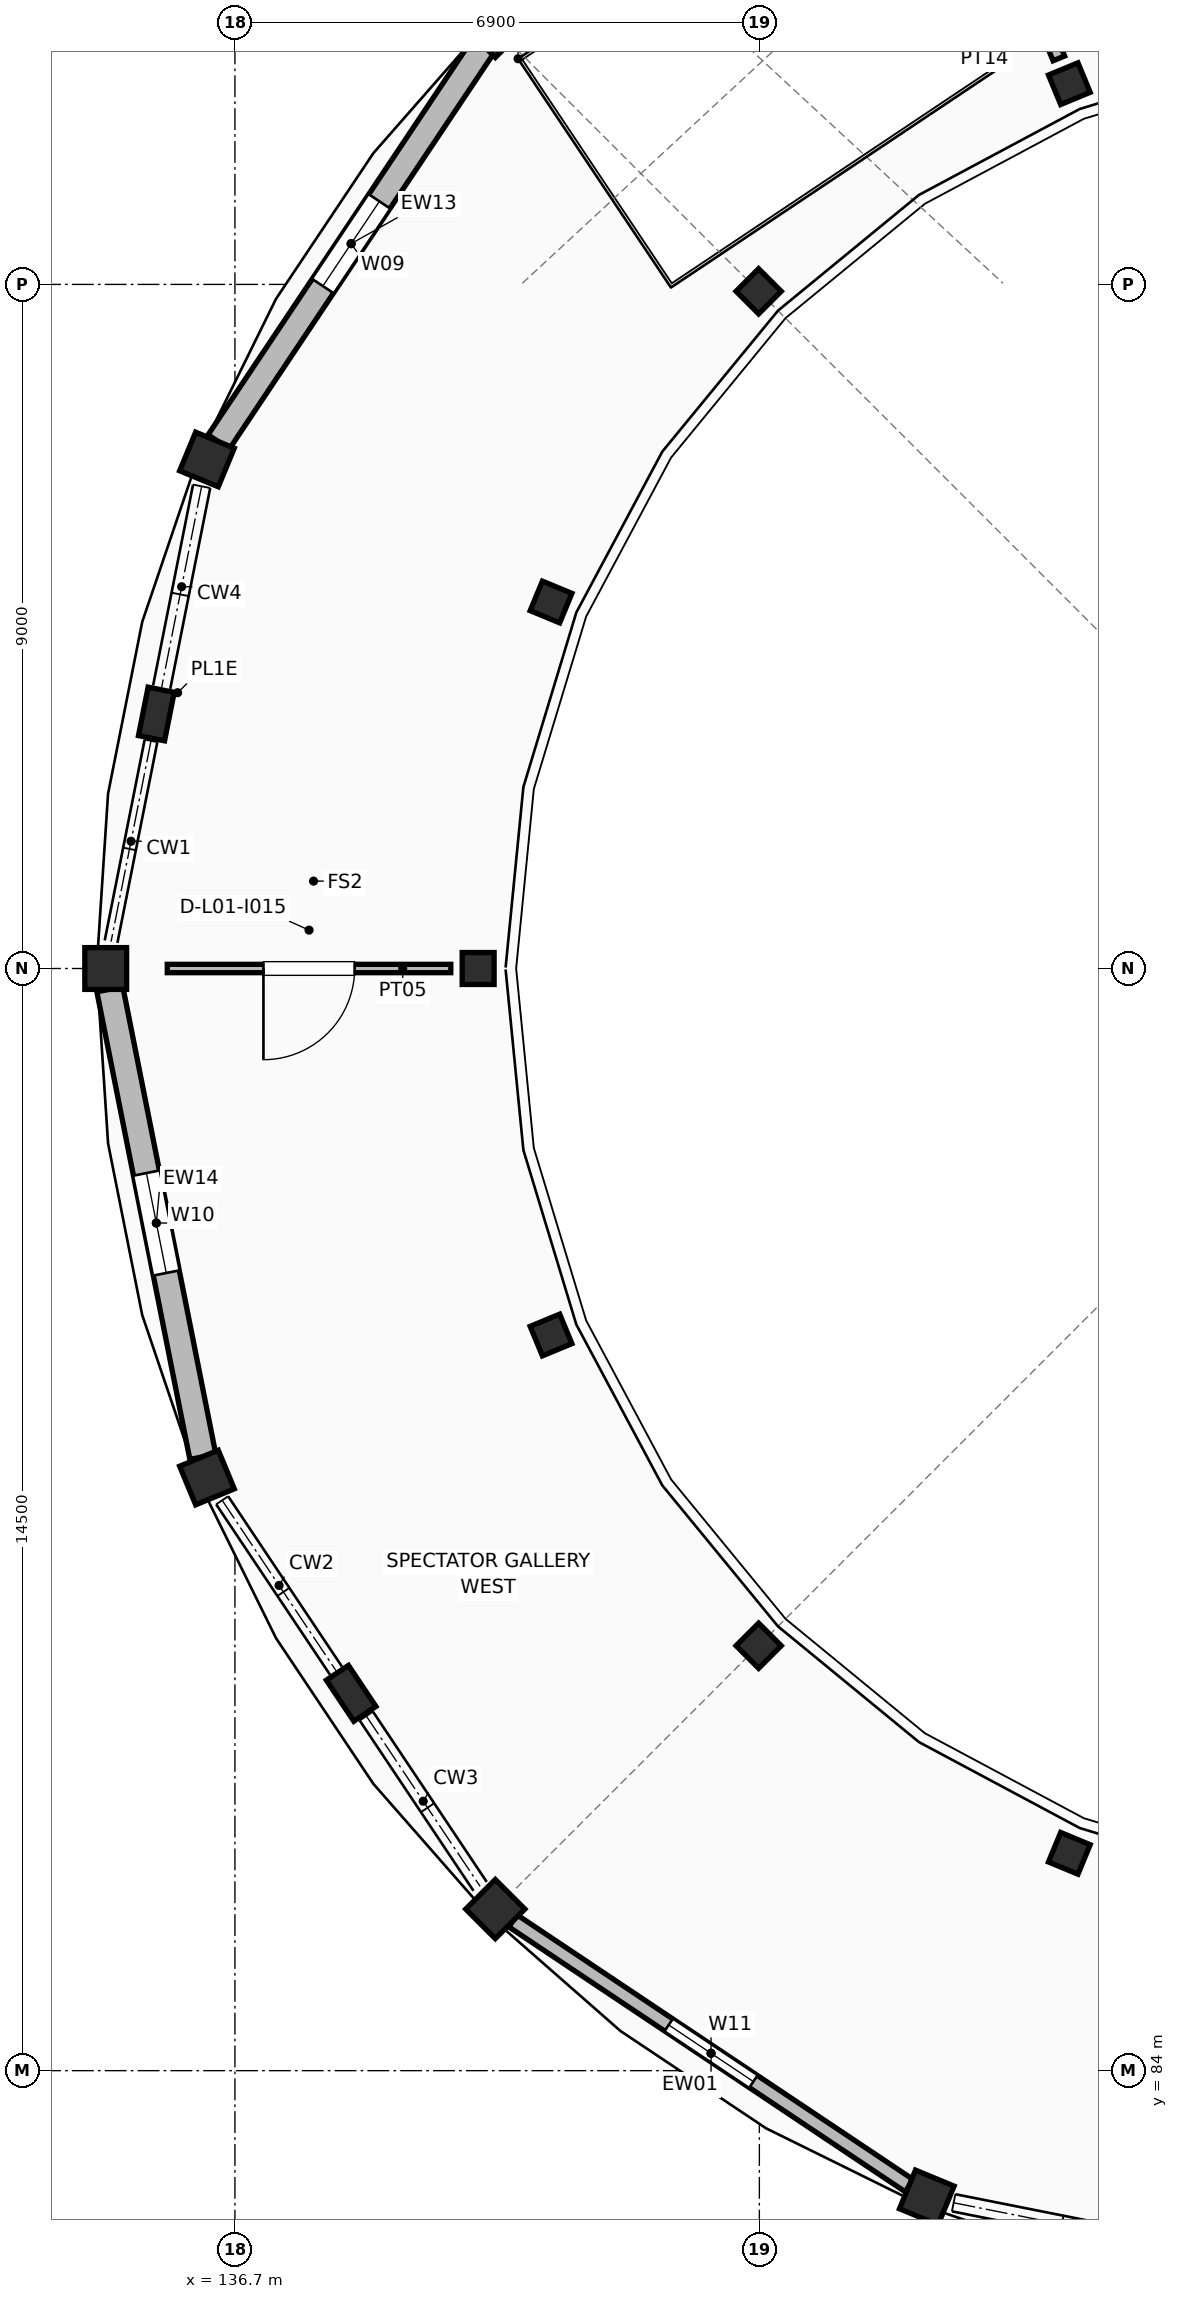
"""IFC4 building model, lengths in metres.
Left out: names, types, materials, properties, quantities, classifications, styles, units other than length and angle.
Written with IfcOpenShell. Run it as: python <this file> out.ifc"""

import sys

from ifc_helpers import new_model, si_unit, direction, frame, frame_2d, origin, origin_2d, place, context, subcontext, project, spatial, rectangle, extrude, element, fill, save


model = new_model("IFC4")
c1 = context("Model", 3, precision=1e-05, world=origin(), true_north=direction((0.0, 1.0)))
c2 = subcontext(c1, "Body", "Model", "MODEL_VIEW")
j1 = project(units=[si_unit("LENGTHUNIT", "METRE"), si_unit("PLANEANGLEUNIT", "RADIAN")], contexts=[c1])
p1 = place(None, origin())
s1 = spatial("IfcSite", under=j1, at=p1, CompositionType="ELEMENT")
p2 = place(p1, origin())
s2 = spatial("IfcBuilding", under=s1, at=p2, CompositionType="ELEMENT")
p3 = place(p2, frame((0.0, 0.0, 4.42)))
s3 = spatial("IfcBuildingStorey", under=s2, at=p3, CompositionType="ELEMENT", Elevation=4.42)
for number, where, z_axis, x_axis in (
    (1, (147.678, 110.141, 0.0), (0.0, 0.0, 1.0), (-0.383, 0.924, 0.0)),
    (2, (143.591, 107.409, 0.0), (0.0, 0.0, 1.0), (-0.707, 0.707, 0.0)),
):
    element("IfcColumn", number, at=place(p3, frame(where, z_axis=z_axis, x_axis=x_axis)), inside=s3, PredefinedType="COLUMN", context=c2, shape_type="SweptSolid", body=[
        extrude(rectangle(XDim=0.42, YDim=0.42, at=origin_2d()), origin(), (0.0, 0.0, 1.0), 3.74),
    ])
p4 = place(p3, frame((140.126, 110.874, 0.0), z_axis=(0.0, 0.0, 1.0), x_axis=(-0.707106781187, 0.707106781187, 0.0)))
e3 = element("IfcColumn", 3, at=p4, inside=s3, PredefinedType="COLUMN", context=c2, shape_type="SweptSolid", body=[
    extrude(rectangle(XDim=0.55, YDim=0.55, at=origin_2d()), origin(), (0.0, 0.0, 1.0), 3.74),
])
p5 = place(p3, frame((140.859, 103.322, 0.0), z_axis=(0.0, 0.0, 1.0), x_axis=(-0.923879532511, 0.382683432365, 0.0)))
e4 = element("IfcColumn", 4, at=p5, inside=s3, PredefinedType="COLUMN", context=c2, shape_type="SweptSolid", body=[
    extrude(rectangle(XDim=0.42, YDim=0.42, at=origin_2d()), origin(), (0.0, 0.0, 1.0), 3.74),
])
p6 = place(p3, frame((136.332, 105.197, 0.0), z_axis=(0.0, 0.0, 1.0), x_axis=(-0.923879532511, 0.382683432365, 0.0)))
e5 = element("IfcColumn", 5, at=p6, inside=s3, PredefinedType="COLUMN", context=c2, shape_type="SweptSolid", body=[
    extrude(rectangle(XDim=0.55, YDim=0.55, at=origin_2d()), origin(), (0.0, 0.0, 1.0), 3.74),
])
p7 = place(p3, frame((139.9, 98.5, 0.0), z_axis=(0.0, 0.0, 1.0), x_axis=(-1.0, 0.0, 0.0)))
e6 = element("IfcColumn", 6, at=p7, inside=s3, PredefinedType="COLUMN", context=c2, shape_type="SweptSolid", body=[
    extrude(rectangle(XDim=0.42, YDim=0.42, at=origin_2d()), origin(), (0.0, 0.0, 1.0), 3.74),
])
p8 = place(p3, frame((135.0, 98.5, 0.0), z_axis=(0.0, 0.0, 1.0), x_axis=(-1.0, 0.0, 0.0)))
e7 = element("IfcColumn", 7, at=p8, inside=s3, PredefinedType="COLUMN", context=c2, shape_type="SweptSolid", body=[
    extrude(rectangle(XDim=0.55, YDim=0.55, at=origin_2d()), origin(), (0.0, 0.0, 1.0), 3.74),
])
p9 = place(p3, frame((140.859, 93.678, 0.0), z_axis=(0.0, 0.0, 1.0), x_axis=(-0.923879532511, -0.382683432365, 0.0)))
e8 = element("IfcColumn", 8, at=p9, inside=s3, PredefinedType="COLUMN", context=c2, shape_type="SweptSolid", body=[
    extrude(rectangle(XDim=0.42, YDim=0.42, at=origin_2d()), origin(), (0.0, 0.0, 1.0), 3.74),
])
p10 = place(p3, frame((136.332, 91.803, 0.0), z_axis=(0.0, 0.0, 1.0), x_axis=(-0.923879532511, -0.382683432365, 0.0)))
e9 = element("IfcColumn", 9, at=p10, inside=s3, PredefinedType="COLUMN", context=c2, shape_type="SweptSolid", body=[
    extrude(rectangle(XDim=0.55, YDim=0.55, at=origin_2d()), origin(), (0.0, 0.0, 1.0), 3.74),
])
p11 = place(p3, frame((143.591, 89.591, 0.0), z_axis=(0.0, 0.0, 1.0), x_axis=(-0.707106781187, -0.707106781187, 0.0)))
e10 = element("IfcColumn", 10, at=p11, inside=s3, PredefinedType="COLUMN", context=c2, shape_type="SweptSolid", body=[
    extrude(rectangle(XDim=0.42, YDim=0.42, at=origin_2d()), origin(), (0.0, 0.0, 1.0), 3.74),
])
p12 = place(p3, frame((140.126, 86.126, 0.0), z_axis=(0.0, 0.0, 1.0), x_axis=(-0.707106781187, -0.707106781187, 0.0)))
e11 = element("IfcColumn", 11, at=p12, inside=s3, PredefinedType="COLUMN", context=c2, shape_type="SweptSolid", body=[
    extrude(rectangle(XDim=0.55, YDim=0.55, at=origin_2d()), origin(), (0.0, 0.0, 1.0), 3.74),
])
p13 = place(p3, frame((147.678, 86.859, 0.0), z_axis=(0.0, 0.0, 1.0), x_axis=(-0.382683432365, -0.923879532511, 0.0)))
e12 = element("IfcColumn", 12, at=p13, inside=s3, PredefinedType="COLUMN", context=c2, shape_type="SweptSolid", body=[
    extrude(rectangle(XDim=0.42, YDim=0.42, at=origin_2d()), origin(), (0.0, 0.0, 1.0), 3.74),
])
p14 = place(p3, frame((145.803, 82.332, 0.0), z_axis=(0.0, 0.0, 1.0), x_axis=(-0.382683432365, -0.923879532511, 0.0)))
e13 = element("IfcColumn", 13, at=p14, inside=s3, PredefinedType="COLUMN", context=c2, shape_type="SweptSolid", body=[
    extrude(rectangle(XDim=0.55, YDim=0.55, at=origin_2d()), origin(), (0.0, 0.0, 1.0), 3.74),
])
for number, where, z_axis, x_axis in (
    (14, (135.666, 101.848, 0.0), (0.0, 0.0, 1.0), (-0.981, 0.195, 0.0)),
    (15, (138.229, 88.964, 0.0), (0.0, 0.0, 1.0), (-0.831, -0.556, 0.0)),
):
    element("IfcColumn", number, at=place(p3, frame(where, z_axis=z_axis, x_axis=x_axis)), inside=s3, PredefinedType="PILASTER", context=c2, shape_type="SweptSolid", body=[
        extrude(rectangle(XDim=0.35, YDim=0.65, at=origin_2d()), origin(), (0.0, 0.0, 1.0), 3.74),
    ])
p15 = place(p3, frame((139.971, 110.643, 0.0), z_axis=(0.0, 0.0, 1.0), x_axis=(-0.555571204893, -0.831468962917, 0.0)))
e16 = element("IfcWall", 16, at=p15, inside=s3, PredefinedType="STANDARD", context=c2, shape_type="SweptSolid", body=[
    extrude(rectangle(XDim=6.272, YDim=0.336, at=frame_2d((3.136, 0.0))), origin(), (0.0, 0.0, 1.0), 2.78),
])
p16 = place(p15, frame((2.466, 0.0, 0.95)))
e17 = element("IfcOpeningElement", 17, at=p16, cuts=e16, PredefinedType="OPENING", context=c2, shape_type="SweptSolid", body=[
    extrude(rectangle(XDim=1.34, YDim=1.15, at=frame_2d((0.67, 0.575))), frame((0.0, 0.178, 0.0), z_axis=(0.0, -1.0, 0.0), x_axis=(1.0, 0.0, 0.0)), (0.0, 0.0, 1.0), 0.356),
])
p17 = place(p3, frame((135.054, 98.227, 0.0), z_axis=(0.0, 0.0, 1.0), x_axis=(0.195090512195, -0.980785242574, 0.0)))
e18 = element("IfcWall", 18, at=p17, inside=s3, PredefinedType="STANDARD", context=c2, shape_type="SweptSolid", body=[
    extrude(rectangle(XDim=6.272, YDim=0.348, at=frame_2d((3.136, 0.0))), origin(), (0.0, 0.0, 1.0), 2.78),
])
p18 = place(p17, frame((2.466, 0.0, 0.95)))
e19 = element("IfcOpeningElement", 19, at=p18, cuts=e18, PredefinedType="OPENING", context=c2, shape_type="SweptSolid", body=[
    extrude(rectangle(XDim=1.34, YDim=1.3, at=frame_2d((0.67, 0.65))), frame((0.0, 0.184, 0.0), z_axis=(0.0, -1.0, 0.0), x_axis=(1.0, 0.0, 0.0)), (0.0, 0.0, 1.0), 0.368),
])
p19 = place(p3, frame((140.357, 85.971, 0.0), z_axis=(0.0, 0.0, 1.0), x_axis=(0.831468962917, -0.555571204893, 0.0)))
e20 = element("IfcWall", 20, at=p19, inside=s3, PredefinedType="STANDARD", context=c2, shape_type="SweptSolid", body=[
    extrude(rectangle(XDim=6.272, YDim=0.192, at=frame_2d((3.136, 0.0))), origin(), (0.0, 0.0, 1.0), 2.78),
])
p20 = place(p19, frame((2.466, 0.0, 0.95)))
e21 = element("IfcOpeningElement", 21, at=p20, cuts=e20, PredefinedType="OPENING", context=c2, shape_type="SweptSolid", body=[
    extrude(rectangle(XDim=1.34, YDim=1.45, at=frame_2d((0.67, 0.725))), frame((0.0, 0.106, 0.0), z_axis=(0.0, -1.0, 0.0), x_axis=(1.0, 0.0, 0.0)), (0.0, 0.0, 1.0), 0.212),
])
p21 = place(p3, frame((147.541, 110.473, 0.0), z_axis=(0.0, 0.0, 1.0), x_axis=(-0.38270441435, 0.923870841209, 0.0)))
e22 = element("IfcWall", 22, at=p21, inside=s3, PredefinedType="PARTITIONING", context=c2, shape_type="SweptSolid", body=[
    extrude(rectangle(XDim=3.73, YDim=0.164, at=frame_2d((1.865, 0.0))), origin(), (0.0, 0.0, 1.0), 2.75),
])
p22 = place(p21, frame((1.29, 0.0, 0.0)))
e23 = element("IfcOpeningElement", 23, at=p22, cuts=e22, PredefinedType="OPENING", context=c2, shape_type="SweptSolid", body=[
    extrude(rectangle(XDim=1.15, YDim=2.18, at=frame_2d((0.575, 1.09))), frame((0.0, 0.092, 0.0), z_axis=(0.0, -1.0, 0.0), x_axis=(1.0, 0.0, 0.0)), (0.0, 0.0, 1.0), 0.184),
])
p23 = place(p3, frame((139.54, 98.5, 0.0), z_axis=(0.0, 0.0, 1.0), x_axis=(-1.0, 0.0, 0.0)))
e24 = element("IfcWall", 24, at=p23, inside=s3, PredefinedType="PARTITIONING", context=c2, shape_type="SweptSolid", body=[
    extrude(rectangle(XDim=3.73, YDim=0.11, at=frame_2d((1.865, 0.0))), origin(), (0.0, 0.0, 1.0), 2.75),
])
p24 = place(p23, frame((1.265, 0.0, 0.0)))
e25 = element("IfcOpeningElement", 25, at=p24, cuts=e24, PredefinedType="OPENING", context=c2, shape_type="SweptSolid", body=[
    extrude(rectangle(XDim=1.2, YDim=2.24, at=frame_2d((0.6, 1.12))), frame((0.0, 0.065, 0.0), z_axis=(0.0, -1.0, 0.0), x_axis=(1.0, 0.0, 0.0)), (0.0, 0.0, 1.0), 0.13),
])
p25 = place(p16, origin())
e26 = element("IfcWindow", 26, at=p25, inside=s3, PartitioningType="SINGLE_PANEL", PredefinedType="WINDOW", context=c2, shape_type="SweptSolid", body=[
    extrude(rectangle(XDim=1.34, YDim=1.15, at=frame_2d((0.67, 0.575))), frame((0.0, 0.03, 0.0), z_axis=(0.0, -1.0, 0.0), x_axis=(1.0, 0.0, 0.0)), (0.0, 0.0, 1.0), 0.06),
])
fill(e17, e26)
p26 = place(p18, origin())
e27 = element("IfcWindow", 27, at=p26, inside=s3, PartitioningType="SINGLE_PANEL", PredefinedType="WINDOW", context=c2, shape_type="SweptSolid", body=[
    extrude(rectangle(XDim=1.34, YDim=1.3, at=frame_2d((0.67, 0.65))), frame((0.0, 0.03, 0.0), z_axis=(0.0, -1.0, 0.0), x_axis=(1.0, 0.0, 0.0)), (0.0, 0.0, 1.0), 0.06),
])
fill(e19, e27)
p27 = place(p20, origin())
e28 = element("IfcWindow", 28, at=p27, inside=s3, PartitioningType="SINGLE_PANEL", PredefinedType="WINDOW", context=c2, shape_type="SweptSolid", body=[
    extrude(rectangle(XDim=1.34, YDim=1.45, at=frame_2d((0.67, 0.725))), frame((0.0, 0.03, 0.0), z_axis=(0.0, -1.0, 0.0), x_axis=(1.0, 0.0, 0.0)), (0.0, 0.0, 1.0), 0.06),
])
fill(e21, e28)
p28 = place(p24, frame((1.2, 0.0, 0.0), z_axis=(0.0, 0.0, 1.0), x_axis=(-1.0, 0.0, 0.0)))
e29 = element("IfcDoor", 29, at=p28, inside=s3, OperationType="SINGLE_SWING_RIGHT", PredefinedType="DOOR", context=c2, shape_type="SweptSolid", body=[
    extrude(rectangle(XDim=1.2, YDim=2.24, at=frame_2d((0.6, 1.12))), frame((0.0, 0.025, 0.0), z_axis=(0.0, -1.0, 0.0), x_axis=(1.0, 0.0, 0.0)), (0.0, 0.0, 1.0), 0.05),
])
fill(e25, e29)
save(model, sys.argv[1])
